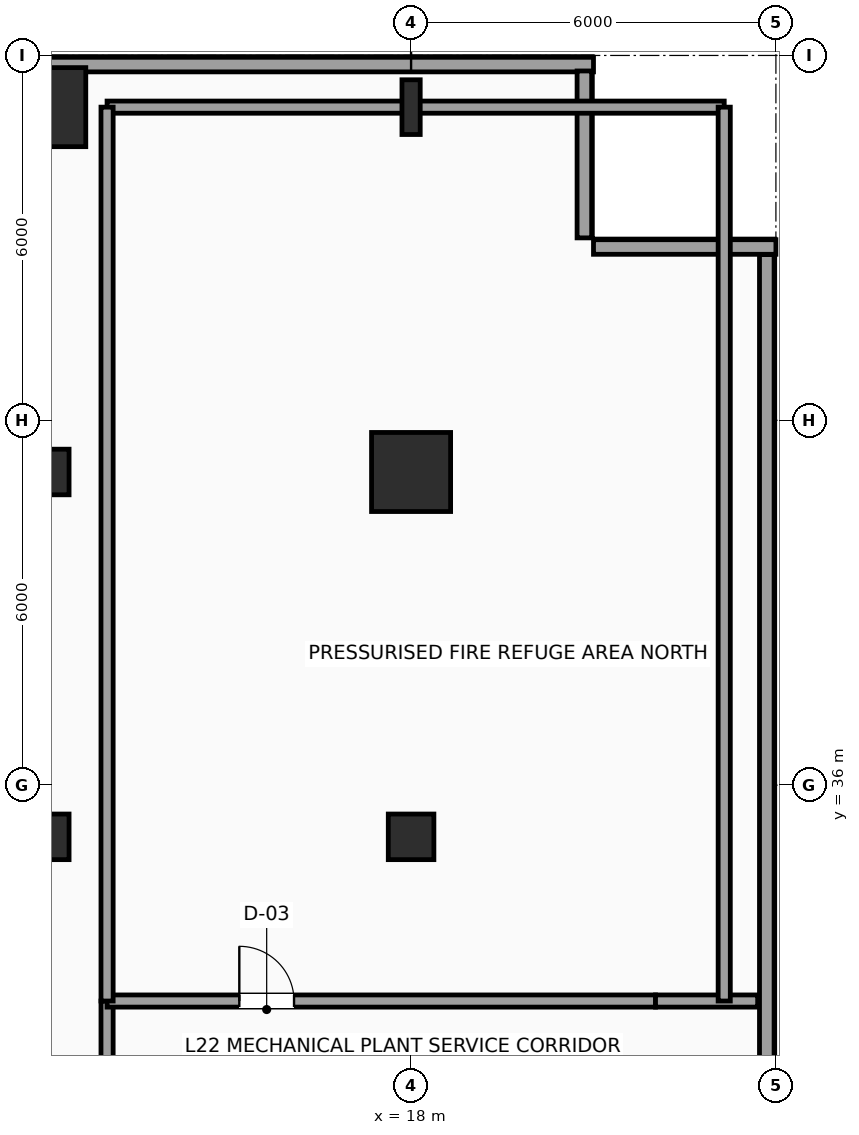
"""IFC4 building model, lengths in metres.
Left out: names, types, materials, properties, quantities, classifications, styles, units other than length and angle.
Written with IfcOpenShell. Run it as: python <this file> out.ifc"""

import sys

from ifc_helpers import new_model, si_unit, direction, frame, frame_2d, origin, origin_2d, place, context, subcontext, project, spatial, rectangle, hollow_rectangle, i_section, extrude, element, fill, save


model = new_model("IFC4")
c1 = context("Model", 3, precision=1e-05, world=origin(), true_north=direction((0.0, 1.0)))
c2 = subcontext(c1, "Body", "Model", "MODEL_VIEW")
j1 = project(units=[si_unit("LENGTHUNIT", "METRE"), si_unit("PLANEANGLEUNIT", "RADIAN")], contexts=[c1])
p1 = place(None, origin())
s1 = spatial("IfcSite", under=j1, at=p1, CompositionType="ELEMENT")
p2 = place(p1, origin())
s2 = spatial("IfcBuilding", under=s1, at=p2, CompositionType="ELEMENT")
p3 = place(p2, frame((0.0, 0.0, 94.8)))
s3 = spatial("IfcBuildingStorey", under=s2, at=p3, CompositionType="ELEMENT", Elevation=94.8)
for number, where, z_axis, x_axis in (
    (1, (12.0, 35.15, 0.0), (0.0, 0.0, 1.0), (1.0, 0.0, 0.0)),
    (2, (12.0, 41.15, 0.0), (0.0, 0.0, 1.0), (1.0, 0.0, 0.0)),
):
    element("IfcColumn", number, at=place(p3, frame(where, z_axis=z_axis, x_axis=x_axis)), inside=s3, PredefinedType="COLUMN", context=c2, shape_type="SweptSolid", body=[
        extrude(hollow_rectangle(XDim=0.75, YDim=0.75, WallThickness=0.035, InnerFilletRadius=0.035, OuterFilletRadius=0.05, at=origin_2d()), origin(), (0.0, 0.0, 1.0), 4.8),
    ])
p4 = place(p3, frame((12.0, 47.15, 0.0), z_axis=(0.0, 0.0, 1.0), x_axis=(1.0, 0.0, 0.0)))
e3 = element("IfcColumn", 3, at=p4, inside=s3, PredefinedType="COLUMN", context=c2, shape_type="SweptSolid", body=[
    extrude(rectangle(XDim=1.3, YDim=1.3, at=origin_2d()), origin(), (0.0, 0.0, 1.0), 4.56),
])
p5 = place(p3, frame((18.0, 35.15, 0.0), z_axis=(0.0, 0.0, 1.0), x_axis=(1.0, 0.0, 0.0)))
e4 = element("IfcColumn", 4, at=p5, inside=s3, PredefinedType="COLUMN", context=c2, shape_type="SweptSolid", body=[
    extrude(hollow_rectangle(XDim=0.75, YDim=0.75, WallThickness=0.035, InnerFilletRadius=0.035, OuterFilletRadius=0.05, at=origin_2d()), origin(), (0.0, 0.0, 1.0), 4.8),
])
p6 = place(p3, frame((18.0, 41.15, 0.0), z_axis=(0.0, 0.0, 1.0), x_axis=(1.0, 0.0, 0.0)))
e5 = element("IfcColumn", 5, at=p6, inside=s3, PredefinedType="COLUMN", context=c2, shape_type="SweptSolid", body=[
    extrude(rectangle(XDim=1.3, YDim=1.3, at=origin_2d()), origin(), (0.0, 0.0, 1.0), 4.8),
])
p7 = place(p3, frame((18.0, 47.15, 0.0), z_axis=(0.0, 0.0, 1.0), x_axis=(1.0, 0.0, 0.0)))
e6 = element("IfcColumn", 6, at=p7, inside=s3, PredefinedType="COLUMN", context=c2, shape_type="SweptSolid", body=[
    extrude(i_section(OverallWidth=0.3, OverallDepth=0.9, WebThickness=0.019, FlangeThickness=0.035, FilletRadius=0.03, at=origin_2d()), origin(), (0.0, 0.0, 1.0), 4.56),
])
p8 = place(p3, frame((3.0, 47.85, 0.0), z_axis=(0.0, 0.0, 1.0), x_axis=(1.0, 0.0, 0.0)))
e7 = element("IfcWall", 7, at=p8, inside=s3, PredefinedType="SOLIDWALL", context=c2, shape_type="SweptSolid", body=[
    extrude(rectangle(XDim=18.0, YDim=0.24, at=frame_2d((9.0, 0.0))), origin(), (0.0, 0.0, 1.0), 4.575),
])
p9 = place(p3, frame((20.85, 47.745, 0.0), z_axis=(0.0, 0.0, 1.0), x_axis=(0.0, -1.0, 0.0)))
e8 = element("IfcWall", 8, at=p9, inside=s3, PredefinedType="SOLIDWALL", context=c2, shape_type="SweptSolid", body=[
    extrude(rectangle(XDim=2.745, YDim=0.24, at=frame_2d((1.373, 0.0))), origin(), (0.0, 0.0, 1.0), 4.575),
])
p10 = place(p3, frame((21.0, 44.85, 0.0), z_axis=(0.0, 0.0, 1.0), x_axis=(1.0, 0.0, 0.0)))
e9 = element("IfcWall", 9, at=p10, inside=s3, PredefinedType="SOLIDWALL", context=c2, shape_type="SweptSolid", body=[
    extrude(rectangle(XDim=3.0, YDim=0.24, at=frame_2d((1.5, 0.0))), origin(), (0.0, 0.0, 1.0), 4.575),
])
p11 = place(p3, frame((23.85, 44.725, 0.0), z_axis=(0.0, 0.0, 1.0), x_axis=(0.0, -1.0, 0.0)))
e10 = element("IfcWall", 10, at=p11, inside=s3, PredefinedType="SOLIDWALL", context=c2, shape_type="SweptSolid", body=[
    extrude(rectangle(XDim=20.725, YDim=0.24, at=frame_2d((10.363, 0.0))), origin(), (0.0, 0.0, 1.0), 4.575),
])
p12 = place(p3, frame((13.0, 30.1, 0.0), z_axis=(0.0, 0.0, 1.0), x_axis=(0.0, 1.0, 0.0)))
e11 = element("IfcWall", 11, at=p12, inside=s3, PredefinedType="SOLIDWALL", context=c2, shape_type="SweptSolid", body=[
    extrude(rectangle(XDim=2.35, YDim=0.2, at=frame_2d((1.175, 0.0))), origin(), (0.0, 0.0, 1.0), 4.575),
])
p13 = place(p3, frame((13.0, 32.45, 0.0), z_axis=(0.0, 0.0, 1.0), x_axis=(1.0, 0.0, 0.0)))
e12 = element("IfcWall", 12, at=p13, inside=s3, PredefinedType="SOLIDWALL", context=c2, shape_type="SweptSolid", body=[
    extrude(rectangle(XDim=9.02, YDim=0.2, at=frame_2d((4.51, 0.0))), origin(), (0.0, 0.0, 1.0), 4.575),
])
p14 = place(p13, frame((2.175, 0.0, 0.0)))
e13 = element("IfcOpeningElement", 13, at=p14, cuts=e12, PredefinedType="OPENING", context=c2, shape_type="SweptSolid", body=[
    extrude(rectangle(XDim=0.9, YDim=2.15, at=frame_2d((0.45, 1.075))), frame((0.0, 0.11, 0.0), z_axis=(0.0, -1.0, 0.0), x_axis=(1.0, 0.0, 0.0)), (0.0, 0.0, 1.0), 0.22),
])
p15 = place(p3, frame((22.02, 32.45, 0.0), z_axis=(0.0, 0.0, 1.0), x_axis=(1.0, 0.0, 0.0)))
e14 = element("IfcWall", 14, at=p15, inside=s3, PredefinedType="SOLIDWALL", context=c2, shape_type="SweptSolid", body=[
    extrude(rectangle(XDim=1.68, YDim=0.2, at=frame_2d((0.84, 0.0))), origin(), (0.0, 0.0, 1.0), 4.575),
])
p16 = place(p3, frame((13.0, 47.15, 0.0), z_axis=(0.0, 0.0, 1.0), x_axis=(1.0, 0.0, 0.0)))
e15 = element("IfcWall", 15, at=p16, inside=s3, PredefinedType="SOLIDWALL", context=c2, shape_type="SweptSolid", body=[
    extrude(rectangle(XDim=10.15, YDim=0.2, at=frame_2d((5.075, 0.0))), origin(), (0.0, 0.0, 1.0), 4.052),
])
for number, where, z_axis, x_axis in (
    (16, (13.0, 32.45, 0.0), (0.0, 0.0, 1.0), (0.0, 1.0, 0.0)),
    (17, (23.15, 32.45, 0.0), (0.0, 0.0, 1.0), (0.0, 1.0, 0.0)),
):
    element("IfcWall", number, at=place(p3, frame(where, z_axis=z_axis, x_axis=x_axis)), inside=s3, PredefinedType="SOLIDWALL", context=c2, shape_type="SweptSolid", body=[
        extrude(rectangle(XDim=14.7, YDim=0.2, at=frame_2d((7.35, 0.0))), origin(), (0.0, 0.0, 1.0), 4.575),
    ])
p17 = place(p14, origin())
e18 = element("IfcDoor", 18, at=p17, inside=s3, OperationType="SINGLE_SWING_LEFT", PredefinedType="DOOR", context=c2, shape_type="SweptSolid", body=[
    extrude(rectangle(XDim=0.9, YDim=2.15, at=frame_2d((0.45, 1.075))), frame((0.0, 0.025, 0.0), z_axis=(0.0, -1.0, 0.0), x_axis=(1.0, 0.0, 0.0)), (0.0, 0.0, 1.0), 0.05),
])
fill(e13, e18)
save(model, sys.argv[1])
